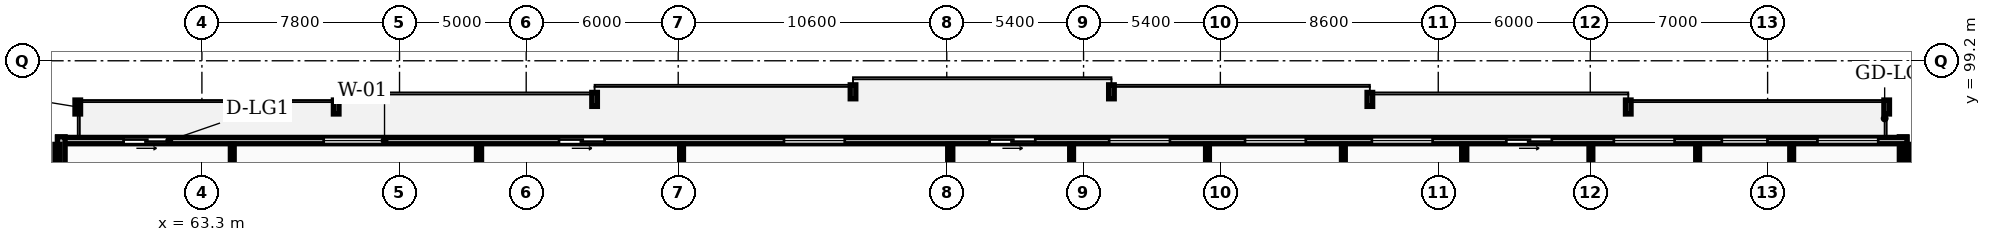
"""IFC4 building model, lengths in metres.
Left out: names, types, materials, properties, quantities, classifications, styles, units other than length and angle.
Written with IfcOpenShell. Run it as: python <this file> out.ifc"""

import sys

from ifc_helpers import new_model, si_unit, direction, frame, frame_2d, origin, place, context, subcontext, project, spatial, rectangle, extrude, element, fill, save


model = new_model("IFC4")
c1 = context("Model", 3, precision=1e-05, world=origin(), true_north=direction((0.0, 1.0)))
c2 = subcontext(c1, "Body", "Model", "MODEL_VIEW")
j1 = project(units=[si_unit("LENGTHUNIT", "METRE"), si_unit("PLANEANGLEUNIT", "RADIAN")], contexts=[c1])
p1 = place(None, origin())
s1 = spatial("IfcSite", under=j1, at=p1, CompositionType="ELEMENT")
p2 = place(p1, origin())
s2 = spatial("IfcBuilding", under=s1, at=p2, CompositionType="ELEMENT")
p3 = place(p2, frame((0.0, 0.0, 126.3)))
s3 = spatial("IfcBuildingStorey", under=s2, at=p3, CompositionType="ELEMENT", Elevation=126.3)
p4 = place(p3, frame((130.45, 92.6, 0.0), z_axis=(0.0, 0.0, 1.0), x_axis=(0.0, 1.0, 0.0)))
e1 = element("IfcWall", 1, at=p4, inside=s3, PredefinedType="STANDARD", context=c2, shape_type="SweptSolid", body=[
    extrude(rectangle(XDim=3.6, YDim=0.3, at=frame_2d((1.8, 0.0))), origin(), (0.0, 0.0, 1.0), 2.97),
])
p5 = place(p3, frame((130.6, 96.05, 0.0), z_axis=(0.0, 0.0, 1.0), x_axis=(-1.0, 0.0, 0.0)))
e2 = element("IfcWall", 2, at=p5, inside=s3, PredefinedType="STANDARD", context=c2, shape_type="SweptSolid", body=[
    extrude(rectangle(XDim=73.0, YDim=0.25, at=frame_2d((36.5, 0.0))), origin(), (0.0, 0.0, 1.0), 2.97),
])
p6 = place(p5, frame((68.591, 0.0, 0.0)))
e3 = element("IfcOpeningElement", 3, at=p6, cuts=e2, PredefinedType="OPENING", context=c2, shape_type="SweptSolid", body=[
    extrude(rectangle(XDim=1.8, YDim=2.2, at=frame_2d((0.9, 1.1))), frame((0.0, 0.135, 0.0), z_axis=(0.0, -1.0, 0.0), x_axis=(1.0, 0.0, 0.0)), (0.0, 0.0, 1.0), 0.27),
])
p7 = place(p5, frame((60.092, 0.0, 0.85)))
e4 = element("IfcOpeningElement", 4, at=p7, cuts=e2, PredefinedType="OPENING", context=c2, shape_type="SweptSolid", body=[
    extrude(rectangle(XDim=2.4, YDim=1.9, at=frame_2d((1.2, 0.95))), frame((0.0, 0.135, 0.0), z_axis=(0.0, -1.0, 0.0), x_axis=(1.0, 0.0, 0.0)), (0.0, 0.0, 1.0), 0.27),
])
p8 = place(p5, frame((51.405, 0.0, 0.0)))
e5 = element("IfcOpeningElement", 5, at=p8, cuts=e2, PredefinedType="OPENING", context=c2, shape_type="SweptSolid", body=[
    extrude(rectangle(XDim=1.8, YDim=2.2, at=frame_2d((0.9, 1.1))), frame((0.0, 0.135, 0.0), z_axis=(0.0, -1.0, 0.0), x_axis=(1.0, 0.0, 0.0)), (0.0, 0.0, 1.0), 0.27),
])
p9 = place(p5, frame((41.925, 0.0, 0.85)))
e6 = element("IfcOpeningElement", 6, at=p9, cuts=e2, PredefinedType="OPENING", context=c2, shape_type="SweptSolid", body=[
    extrude(rectangle(XDim=2.4, YDim=1.9, at=frame_2d((1.2, 0.95))), frame((0.0, 0.135, 0.0), z_axis=(0.0, -1.0, 0.0), x_axis=(1.0, 0.0, 0.0)), (0.0, 0.0, 1.0), 0.27),
])
p10 = place(p5, frame((29.091, 0.0, 0.85)))
e7 = element("IfcOpeningElement", 7, at=p10, cuts=e2, PredefinedType="OPENING", context=c2, shape_type="SweptSolid", body=[
    extrude(rectangle(XDim=2.4, YDim=1.9, at=frame_2d((1.2, 0.95))), frame((0.0, 0.135, 0.0), z_axis=(0.0, -1.0, 0.0), x_axis=(1.0, 0.0, 0.0)), (0.0, 0.0, 1.0), 0.27),
])
p11 = place(p5, frame((23.727, 0.0, 0.85)))
e8 = element("IfcOpeningElement", 8, at=p11, cuts=e2, PredefinedType="OPENING", context=c2, shape_type="SweptSolid", body=[
    extrude(rectangle(XDim=2.4, YDim=1.9, at=frame_2d((1.2, 0.95))), frame((0.0, 0.135, 0.0), z_axis=(0.0, -1.0, 0.0), x_axis=(1.0, 0.0, 0.0)), (0.0, 0.0, 1.0), 0.27),
])
p12 = place(p5, frame((34.407, 0.0, 0.0)))
e9 = element("IfcOpeningElement", 9, at=p12, cuts=e2, PredefinedType="OPENING", context=c2, shape_type="SweptSolid", body=[
    extrude(rectangle(XDim=1.8, YDim=2.2, at=frame_2d((0.9, 1.1))), frame((0.0, 0.135, 0.0), z_axis=(0.0, -1.0, 0.0), x_axis=(1.0, 0.0, 0.0)), (0.0, 0.0, 1.0), 0.27),
])
p13 = place(p5, frame((18.72, 0.0, 0.85)))
e10 = element("IfcOpeningElement", 10, at=p13, cuts=e2, PredefinedType="OPENING", context=c2, shape_type="SweptSolid", body=[
    extrude(rectangle(XDim=2.4, YDim=1.9, at=frame_2d((1.2, 0.95))), frame((0.0, 0.135, 0.0), z_axis=(0.0, -1.0, 0.0), x_axis=(1.0, 0.0, 0.0)), (0.0, 0.0, 1.0), 0.27),
])
p14 = place(p5, frame((9.169, 0.0, 0.85)))
e11 = element("IfcOpeningElement", 11, at=p14, cuts=e2, PredefinedType="OPENING", context=c2, shape_type="SweptSolid", body=[
    extrude(rectangle(XDim=2.4, YDim=1.9, at=frame_2d((1.2, 0.95))), frame((0.0, 0.135, 0.0), z_axis=(0.0, -1.0, 0.0), x_axis=(1.0, 0.0, 0.0)), (0.0, 0.0, 1.0), 0.27),
])
p15 = place(p5, frame((5.506, 0.0, 0.85)))
e12 = element("IfcOpeningElement", 12, at=p15, cuts=e2, PredefinedType="OPENING", context=c2, shape_type="SweptSolid", body=[
    extrude(rectangle(XDim=1.8, YDim=1.8, at=frame_2d((0.9, 0.9))), frame((0.0, 0.135, 0.0), z_axis=(0.0, -1.0, 0.0), x_axis=(1.0, 0.0, 0.0)), (0.0, 0.0, 1.0), 0.27),
])
p16 = place(p5, frame((14.015, 0.0, 0.0)))
e13 = element("IfcOpeningElement", 13, at=p16, cuts=e2, PredefinedType="OPENING", context=c2, shape_type="SweptSolid", body=[
    extrude(rectangle(XDim=1.8, YDim=2.2, at=frame_2d((0.9, 1.1))), frame((0.0, 0.135, 0.0), z_axis=(0.0, -1.0, 0.0), x_axis=(1.0, 0.0, 0.0)), (0.0, 0.0, 1.0), 0.27),
])
p17 = place(p5, frame((1.135, 0.0, 0.85)))
e14 = element("IfcOpeningElement", 14, at=p17, cuts=e2, PredefinedType="OPENING", context=c2, shape_type="SweptSolid", body=[
    extrude(rectangle(XDim=2.4, YDim=1.9, at=frame_2d((1.2, 0.95))), frame((0.0, 0.135, 0.0), z_axis=(0.0, -1.0, 0.0), x_axis=(1.0, 0.0, 0.0)), (0.0, 0.0, 1.0), 0.27),
])
p18 = place(p3, frame((57.75, 96.2, 0.0), z_axis=(0.0, 0.0, 1.0), x_axis=(0.0, -1.0, 0.0)))
e15 = element("IfcWall", 15, at=p18, inside=s3, PredefinedType="STANDARD", context=c2, shape_type="SweptSolid", body=[
    extrude(rectangle(XDim=3.6, YDim=0.3, at=frame_2d((1.8, 0.0))), origin(), (0.0, 0.0, 1.0), 2.97),
])
for number, where, z_axis, x_axis in (
    (16, (57.6, 69.83, 0.0), (0.0, 0.0, 1.0), (0.0, 1.0, 0.0)),
    (17, (130.6, 69.83, 0.0), (0.0, 0.0, 1.0), (0.0, 1.0, 0.0)),
    (18, (74.238, 69.83, 0.0), (0.0, 0.0, 1.0), (0.0, 1.0, 0.0)),
):
    element("IfcWall", number, at=place(p3, frame(where, z_axis=z_axis, x_axis=x_axis)), inside=s3, PredefinedType="PARTITIONING", context=c2, shape_type="SweptSolid", body=[
        extrude(rectangle(XDim=26.07, YDim=0.2, at=frame_2d((13.035, 0.0))), origin(), (0.0, 0.0, 1.0), 2.97),
    ])
p19 = place(p3, frame((64.499, 91.43, 0.0), z_axis=(0.0, 0.0, 1.0), x_axis=(0.0, 1.0, 0.0)))
e19 = element("IfcWall", 19, at=p19, inside=s3, PredefinedType="PARTITIONING", context=c2, shape_type="SweptSolid", body=[
    extrude(rectangle(XDim=4.47, YDim=0.15, at=frame_2d((2.235, 0.0))), origin(), (0.0, 0.0, 1.0), 2.97),
])
p20 = place(p3, frame((92.837, 69.83, 0.0), z_axis=(0.0, 0.0, 1.0), x_axis=(0.0, 1.0, 0.0)))
e20 = element("IfcWall", 20, at=p20, inside=s3, PredefinedType="PARTITIONING", context=c2, shape_type="SweptSolid", body=[
    extrude(rectangle(XDim=26.07, YDim=0.2, at=frame_2d((13.035, 0.0))), origin(), (0.0, 0.0, 1.0), 2.97),
])
p21 = place(p3, frame((82.232, 91.43, 0.0), z_axis=(0.0, 0.0, 1.0), x_axis=(0.0, 1.0, 0.0)))
e21 = element("IfcWall", 21, at=p21, inside=s3, PredefinedType="PARTITIONING", context=c2, shape_type="SweptSolid", body=[
    extrude(rectangle(XDim=4.47, YDim=0.15, at=frame_2d((2.235, 0.0))), origin(), (0.0, 0.0, 1.0), 2.97),
])
p22 = place(p3, frame((113.125, 69.83, 0.0), z_axis=(0.0, 0.0, 1.0), x_axis=(0.0, 1.0, 0.0)))
e22 = element("IfcWall", 22, at=p22, inside=s3, PredefinedType="PARTITIONING", context=c2, shape_type="SweptSolid", body=[
    extrude(rectangle(XDim=26.07, YDim=0.2, at=frame_2d((13.035, 0.0))), origin(), (0.0, 0.0, 1.0), 2.97),
])
p23 = place(p3, frame((102.991, 91.43, 0.0), z_axis=(0.0, 0.0, 1.0), x_axis=(0.0, 1.0, 0.0)))
e23 = element("IfcWall", 23, at=p23, inside=s3, PredefinedType="PARTITIONING", context=c2, shape_type="SweptSolid", body=[
    extrude(rectangle(XDim=4.47, YDim=0.15, at=frame_2d((2.235, 0.0))), origin(), (0.0, 0.0, 1.0), 2.97),
])
p24 = place(p3, frame((97.627, 86.29, 0.0), z_axis=(0.0, 0.0, 1.0), x_axis=(0.0, 1.0, 0.0)))
e24 = element("IfcWall", 24, at=p24, inside=s3, PredefinedType="PARTITIONING", context=c2, shape_type="SweptSolid", body=[
    extrude(rectangle(XDim=9.61, YDim=0.15, at=frame_2d((4.805, 0.0))), origin(), (0.0, 0.0, 1.0), 2.97),
])
p25 = place(p24, frame((3.82, 0.0, 0.0)))
e25 = element("IfcOpeningElement", 25, at=p25, cuts=e24, PredefinedType="OPENING", context=c2, shape_type="SweptSolid", body=[
    extrude(rectangle(XDim=0.92, YDim=2.08, at=frame_2d((0.46, 1.04))), frame((0.0, 0.085, 0.0), z_axis=(0.0, -1.0, 0.0), x_axis=(1.0, 0.0, 0.0)), (0.0, 0.0, 1.0), 0.17),
])
p26 = place(p3, frame((108.355, 89.02, 0.0), z_axis=(0.0, 0.0, 1.0), x_axis=(0.0, 1.0, 0.0)))
e26 = element("IfcWall", 26, at=p26, inside=s3, PredefinedType="PARTITIONING", context=c2, shape_type="SweptSolid", body=[
    extrude(rectangle(XDim=6.88, YDim=0.15, at=frame_2d((3.44, 0.0))), origin(), (0.0, 0.0, 1.0), 2.97),
])
p27 = place(p26, frame((1.09, 0.0, 0.0)))
e27 = element("IfcOpeningElement", 27, at=p27, cuts=e26, PredefinedType="OPENING", context=c2, shape_type="SweptSolid", body=[
    extrude(rectangle(XDim=0.92, YDim=2.08, at=frame_2d((0.46, 1.04))), frame((0.0, 0.085, 0.0), z_axis=(0.0, -1.0, 0.0), x_axis=(1.0, 0.0, 0.0)), (0.0, 0.0, 1.0), 0.17),
])
p28 = place(p3, frame((122.337, 91.43, 0.0), z_axis=(0.0, 0.0, 1.0), x_axis=(0.0, 1.0, 0.0)))
e28 = element("IfcWall", 28, at=p28, inside=s3, PredefinedType="PARTITIONING", context=c2, shape_type="SweptSolid", body=[
    extrude(rectangle(XDim=4.47, YDim=0.15, at=frame_2d((2.235, 0.0))), origin(), (0.0, 0.0, 1.0), 2.97),
])
p29 = place(p3, frame((118.125, 86.29, 0.0), z_axis=(0.0, 0.0, 1.0), x_axis=(0.0, 1.0, 0.0)))
e29 = element("IfcWall", 29, at=p29, inside=s3, PredefinedType="PARTITIONING", context=c2, shape_type="SweptSolid", body=[
    extrude(rectangle(XDim=9.61, YDim=0.15, at=frame_2d((4.805, 0.0))), origin(), (0.0, 0.0, 1.0), 2.97),
])
p30 = place(p29, frame((2.88, 0.0, 0.0)))
e30 = element("IfcOpeningElement", 30, at=p30, cuts=e29, PredefinedType="OPENING", context=c2, shape_type="SweptSolid", body=[
    extrude(rectangle(XDim=0.92, YDim=2.08, at=frame_2d((0.46, 1.04))), frame((0.0, 0.085, 0.0), z_axis=(0.0, -1.0, 0.0), x_axis=(1.0, 0.0, 0.0)), (0.0, 0.0, 1.0), 0.17),
])
p31 = place(p3, frame((126.05, 88.91, 0.0), z_axis=(0.0, 0.0, 1.0), x_axis=(0.0, 1.0, 0.0)))
e31 = element("IfcWall", 31, at=p31, inside=s3, PredefinedType="PARTITIONING", context=c2, shape_type="SweptSolid", body=[
    extrude(rectangle(XDim=6.99, YDim=0.15, at=frame_2d((3.495, 0.0))), origin(), (0.0, 0.0, 1.0), 2.97),
])
p32 = place(p31, frame((0.26, 0.0, 0.0)))
e32 = element("IfcOpeningElement", 32, at=p32, cuts=e31, PredefinedType="OPENING", context=c2, shape_type="SweptSolid", body=[
    extrude(rectangle(XDim=0.92, YDim=2.08, at=frame_2d((0.46, 1.04))), frame((0.0, 0.085, 0.0), z_axis=(0.0, -1.0, 0.0), x_axis=(1.0, 0.0, 0.0)), (0.0, 0.0, 1.0), 0.17),
])
p33 = place(p6, origin())
e33 = element("IfcDoor", 33, at=p33, inside=s3, OperationType="SLIDING_TO_LEFT", PredefinedType="DOOR", context=c2, shape_type="SweptSolid", body=[
    extrude(rectangle(XDim=1.8, YDim=2.2, at=frame_2d((0.9, 1.1))), frame((0.0, 0.025, 0.0), z_axis=(0.0, -1.0, 0.0), x_axis=(1.0, 0.0, 0.0)), (0.0, 0.0, 1.0), 0.05),
])
fill(e3, e33)
p34 = place(p7, origin())
e34 = element("IfcWindow", 34, at=p34, inside=s3, PartitioningType="DOUBLE_PANEL_VERTICAL", PredefinedType="WINDOW", context=c2, shape_type="SweptSolid", body=[
    extrude(rectangle(XDim=2.4, YDim=1.9, at=frame_2d((1.2, 0.95))), frame((0.0, 0.03, 0.0), z_axis=(0.0, -1.0, 0.0), x_axis=(1.0, 0.0, 0.0)), (0.0, 0.0, 1.0), 0.06),
])
fill(e4, e34)
p35 = place(p8, origin())
e35 = element("IfcDoor", 35, at=p35, inside=s3, OperationType="SLIDING_TO_LEFT", PredefinedType="DOOR", context=c2, shape_type="SweptSolid", body=[
    extrude(rectangle(XDim=1.8, YDim=2.2, at=frame_2d((0.9, 1.1))), frame((0.0, 0.025, 0.0), z_axis=(0.0, -1.0, 0.0), x_axis=(1.0, 0.0, 0.0)), (0.0, 0.0, 1.0), 0.05),
])
fill(e5, e35)
p36 = place(p9, origin())
e36 = element("IfcWindow", 36, at=p36, inside=s3, PartitioningType="DOUBLE_PANEL_VERTICAL", PredefinedType="WINDOW", context=c2, shape_type="SweptSolid", body=[
    extrude(rectangle(XDim=2.4, YDim=1.9, at=frame_2d((1.2, 0.95))), frame((0.0, 0.03, 0.0), z_axis=(0.0, -1.0, 0.0), x_axis=(1.0, 0.0, 0.0)), (0.0, 0.0, 1.0), 0.06),
])
fill(e6, e36)
p37 = place(p10, origin())
e37 = element("IfcWindow", 37, at=p37, inside=s3, PartitioningType="DOUBLE_PANEL_VERTICAL", PredefinedType="WINDOW", context=c2, shape_type="SweptSolid", body=[
    extrude(rectangle(XDim=2.4, YDim=1.9, at=frame_2d((1.2, 0.95))), frame((0.0, 0.03, 0.0), z_axis=(0.0, -1.0, 0.0), x_axis=(1.0, 0.0, 0.0)), (0.0, 0.0, 1.0), 0.06),
])
fill(e7, e37)
p38 = place(p11, origin())
e38 = element("IfcWindow", 38, at=p38, inside=s3, PartitioningType="DOUBLE_PANEL_VERTICAL", PredefinedType="WINDOW", context=c2, shape_type="SweptSolid", body=[
    extrude(rectangle(XDim=2.4, YDim=1.9, at=frame_2d((1.2, 0.95))), frame((0.0, 0.03, 0.0), z_axis=(0.0, -1.0, 0.0), x_axis=(1.0, 0.0, 0.0)), (0.0, 0.0, 1.0), 0.06),
])
fill(e8, e38)
p39 = place(p12, origin())
e39 = element("IfcDoor", 39, at=p39, inside=s3, OperationType="SLIDING_TO_LEFT", PredefinedType="DOOR", context=c2, shape_type="SweptSolid", body=[
    extrude(rectangle(XDim=1.8, YDim=2.2, at=frame_2d((0.9, 1.1))), frame((0.0, 0.025, 0.0), z_axis=(0.0, -1.0, 0.0), x_axis=(1.0, 0.0, 0.0)), (0.0, 0.0, 1.0), 0.05),
])
fill(e9, e39)
p40 = place(p13, origin())
e40 = element("IfcWindow", 40, at=p40, inside=s3, PartitioningType="DOUBLE_PANEL_VERTICAL", PredefinedType="WINDOW", context=c2, shape_type="SweptSolid", body=[
    extrude(rectangle(XDim=2.4, YDim=1.9, at=frame_2d((1.2, 0.95))), frame((0.0, 0.03, 0.0), z_axis=(0.0, -1.0, 0.0), x_axis=(1.0, 0.0, 0.0)), (0.0, 0.0, 1.0), 0.06),
])
fill(e10, e40)
p41 = place(p14, origin())
e41 = element("IfcWindow", 41, at=p41, inside=s3, PartitioningType="DOUBLE_PANEL_VERTICAL", PredefinedType="WINDOW", context=c2, shape_type="SweptSolid", body=[
    extrude(rectangle(XDim=2.4, YDim=1.9, at=frame_2d((1.2, 0.95))), frame((0.0, 0.03, 0.0), z_axis=(0.0, -1.0, 0.0), x_axis=(1.0, 0.0, 0.0)), (0.0, 0.0, 1.0), 0.06),
])
fill(e11, e41)
p42 = place(p15, origin())
e42 = element("IfcWindow", 42, at=p42, inside=s3, PartitioningType="SINGLE_PANEL", PredefinedType="WINDOW", context=c2, shape_type="SweptSolid", body=[
    extrude(rectangle(XDim=1.8, YDim=1.8, at=frame_2d((0.9, 0.9))), frame((0.0, 0.03, 0.0), z_axis=(0.0, -1.0, 0.0), x_axis=(1.0, 0.0, 0.0)), (0.0, 0.0, 1.0), 0.06),
])
fill(e12, e42)
p43 = place(p16, origin())
e43 = element("IfcDoor", 43, at=p43, inside=s3, OperationType="SLIDING_TO_LEFT", PredefinedType="DOOR", context=c2, shape_type="SweptSolid", body=[
    extrude(rectangle(XDim=1.8, YDim=2.2, at=frame_2d((0.9, 1.1))), frame((0.0, 0.025, 0.0), z_axis=(0.0, -1.0, 0.0), x_axis=(1.0, 0.0, 0.0)), (0.0, 0.0, 1.0), 0.05),
])
fill(e13, e43)
p44 = place(p17, origin())
e44 = element("IfcWindow", 44, at=p44, inside=s3, PartitioningType="DOUBLE_PANEL_VERTICAL", PredefinedType="WINDOW", context=c2, shape_type="SweptSolid", body=[
    extrude(rectangle(XDim=2.4, YDim=1.9, at=frame_2d((1.2, 0.95))), frame((0.0, 0.03, 0.0), z_axis=(0.0, -1.0, 0.0), x_axis=(1.0, 0.0, 0.0)), (0.0, 0.0, 1.0), 0.06),
])
fill(e14, e44)
save(model, sys.argv[1])
